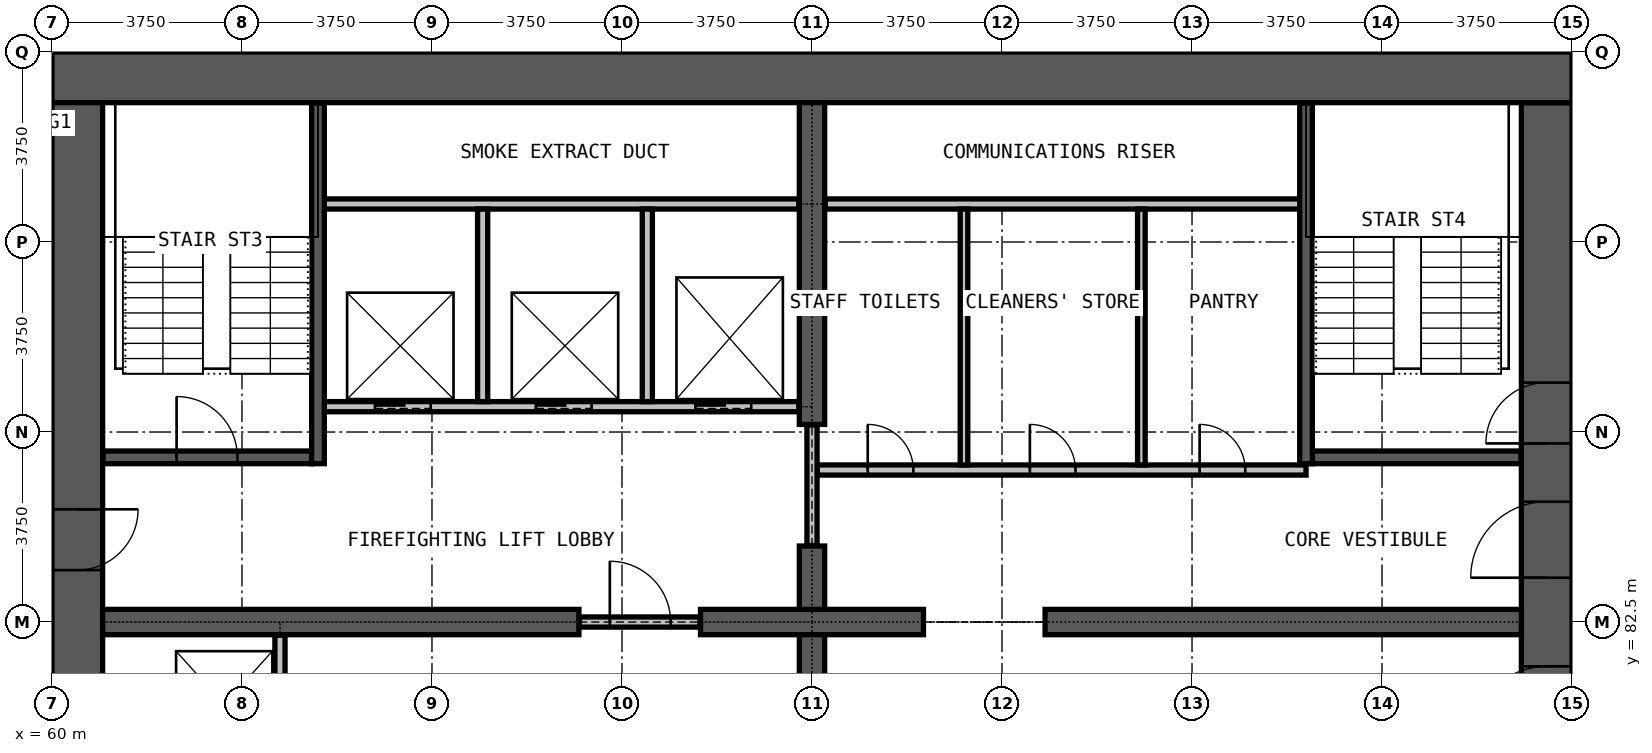
"""IFC4 building model, lengths in metres.
Left out: names, types, materials, properties, quantities, classifications, styles, units other than length and angle.
Written with IfcOpenShell. Run it as: python <this file> out.ifc"""

import sys

from ifc_helpers import new_model, si_unit, direction, frame, frame_2d, origin, place, context, subcontext, project, spatial, rectangle, extrude, element, fill, save


model = new_model("IFC4")
c1 = context("Model", 3, precision=1e-05, world=origin(), true_north=direction((0.0, 1.0)))
c2 = subcontext(c1, "Body", "Model", "MODEL_VIEW")
j1 = project(units=[si_unit("LENGTHUNIT", "METRE"), si_unit("PLANEANGLEUNIT", "RADIAN")], contexts=[c1])
p1 = place(None, origin())
s1 = spatial("IfcSite", under=j1, at=p1, CompositionType="ELEMENT")
p2 = place(p1, origin())
s2 = spatial("IfcBuilding", under=s1, at=p2, CompositionType="ELEMENT")
p3 = place(p2, frame((0.0, 0.0, 49.4)))
s3 = spatial("IfcBuildingStorey", under=s2, at=p3, CompositionType="ELEMENT", Elevation=49.4)
p4 = place(p3, frame((89.5, 72.25, 0.0), z_axis=(0.0, 0.0, 1.0), x_axis=(0.0, 1.0, 0.0)))
e1 = element("IfcWall", 1, at=p4, inside=s3, PredefinedType="SHEAR", context=c2, shape_type="SweptSolid", body=[
    extrude(rectangle(XDim=20.5, YDim=1.0, at=frame_2d((10.25, 0.0))), origin(), (0.0, 0.0, 1.0), 3.3),
])
p5 = place(p4, frame((0.275, 0.0, 0.0)))
e2 = element("IfcOpeningElement", 2, at=p5, cuts=e1, PredefinedType="OPENING", context=c2, shape_type="SweptSolid", body=[
    extrude(rectangle(XDim=1.2, YDim=2.2, at=frame_2d((0.6, 1.1))), frame((0.0, 0.51, 0.0), z_axis=(0.0, -1.0, 0.0), x_axis=(1.0, 0.0, 0.0)), (0.0, 0.0, 1.0), 1.02),
])
p6 = place(p4, frame((13.775, 0.0, 0.0)))
e3 = element("IfcOpeningElement", 3, at=p6, cuts=e1, PredefinedType="OPENING", context=c2, shape_type="SweptSolid", body=[
    extrude(rectangle(XDim=1.2, YDim=2.2, at=frame_2d((0.6, 1.1))), frame((0.0, 0.51, 0.0), z_axis=(0.0, -1.0, 0.0), x_axis=(1.0, 0.0, 0.0)), (0.0, 0.0, 1.0), 1.02),
])
p7 = place(p4, frame((7.875, 0.0, 0.0)))
e4 = element("IfcOpeningElement", 4, at=p7, cuts=e1, PredefinedType="OPENING", context=c2, shape_type="SweptSolid", body=[
    extrude(rectangle(XDim=1.5, YDim=2.2, at=frame_2d((0.75, 1.1))), frame((0.0, 0.51, 0.0), z_axis=(0.0, -1.0, 0.0), x_axis=(1.0, 0.0, 0.0)), (0.0, 0.0, 1.0), 1.02),
])
p8 = place(p4, frame((11.125, 0.0, 0.0)))
e5 = element("IfcOpeningElement", 5, at=p8, cuts=e1, PredefinedType="OPENING", context=c2, shape_type="SweptSolid", body=[
    extrude(rectangle(XDim=1.5, YDim=2.2, at=frame_2d((0.75, 1.1))), frame((0.0, 0.51, 0.0), z_axis=(0.0, -1.0, 0.0), x_axis=(1.0, 0.0, 0.0)), (0.0, 0.0, 1.0), 1.02),
])
p9 = place(p3, frame((90.0, 93.25, 0.0), z_axis=(0.0, 0.0, 1.0), x_axis=(-1.0, 0.0, 0.0)))
e6 = element("IfcWall", 6, at=p9, inside=s3, PredefinedType="SHEAR", context=c2, shape_type="SweptSolid", body=[
    extrude(rectangle(XDim=30.0, YDim=1.0, at=frame_2d((15.0, 0.0))), origin(), (0.0, 0.0, 1.0), 3.3),
])
p10 = place(p3, frame((60.5, 92.75, 0.0), z_axis=(0.0, 0.0, 1.0), x_axis=(0.0, -1.0, 0.0)))
e7 = element("IfcWall", 7, at=p10, inside=s3, PredefinedType="SHEAR", context=c2, shape_type="SweptSolid", body=[
    extrude(rectangle(XDim=20.5, YDim=1.0, at=frame_2d((10.25, 0.0))), origin(), (0.0, 0.0, 1.0), 3.3),
])
p11 = place(p10, frame((19.025, 0.0, 0.0)))
e8 = element("IfcOpeningElement", 8, at=p11, cuts=e7, PredefinedType="OPENING", context=c2, shape_type="SweptSolid", body=[
    extrude(rectangle(XDim=1.2, YDim=2.2, at=frame_2d((0.6, 1.1))), frame((0.0, 0.51, 0.0), z_axis=(0.0, -1.0, 0.0), x_axis=(1.0, 0.0, 0.0)), (0.0, 0.0, 1.0), 1.02),
])
p12 = place(p10, frame((8.025, 0.0, 0.0)))
e9 = element("IfcOpeningElement", 9, at=p12, cuts=e7, PredefinedType="OPENING", context=c2, shape_type="SweptSolid", body=[
    extrude(rectangle(XDim=1.2, YDim=2.2, at=frame_2d((0.6, 1.1))), frame((0.0, 0.51, 0.0), z_axis=(0.0, -1.0, 0.0), x_axis=(1.0, 0.0, 0.0)), (0.0, 0.0, 1.0), 1.02),
])
p13 = place(p3, frame((61.0, 82.5, 0.0), z_axis=(0.0, 0.0, 1.0), x_axis=(1.0, 0.0, 0.0)))
e10 = element("IfcWall", 10, at=p13, inside=s3, PredefinedType="SHEAR", context=c2, shape_type="SweptSolid", body=[
    extrude(rectangle(XDim=9.4, YDim=0.5, at=frame_2d((4.7, 0.0))), origin(), (0.0, 0.0, 1.0), 3.3),
])
p14 = place(p3, frame((72.8, 82.5, 0.0), z_axis=(0.0, 0.0, 1.0), x_axis=(1.0, 0.0, 0.0)))
e11 = element("IfcWall", 11, at=p14, inside=s3, PredefinedType="SHEAR", context=c2, shape_type="SweptSolid", body=[
    extrude(rectangle(XDim=4.4, YDim=0.5, at=frame_2d((2.2, 0.0))), origin(), (0.0, 0.0, 1.0), 3.3),
])
p15 = place(p3, frame((79.6, 82.5, 0.0), z_axis=(0.0, 0.0, 1.0), x_axis=(1.0, 0.0, 0.0)))
e12 = element("IfcWall", 12, at=p15, inside=s3, PredefinedType="SHEAR", context=c2, shape_type="SweptSolid", body=[
    extrude(rectangle(XDim=9.4, YDim=0.5, at=frame_2d((4.7, 0.0))), origin(), (0.0, 0.0, 1.0), 3.3),
])
for number, where, z_axis, x_axis in (
    (13, (75.0, 81.0, 0.0), (0.0, 0.0, 1.0), (0.0, 1.0, 0.0)),
    (14, (75.0, 82.75, 0.0), (0.0, 0.0, 1.0), (0.0, 1.0, 0.0)),
):
    element("IfcWall", number, at=place(p3, frame(where, z_axis=z_axis, x_axis=x_axis)), inside=s3, PredefinedType="SHEAR", context=c2, shape_type="SweptSolid", body=[
        extrude(rectangle(XDim=1.25, YDim=0.5, at=frame_2d((0.625, 0.0))), origin(), (0.0, 0.0, 1.0), 3.3),
    ])
p16 = place(p3, frame((75.0, 86.4, 0.0), z_axis=(0.0, 0.0, 1.0), x_axis=(0.0, 1.0, 0.0)))
e15 = element("IfcWall", 15, at=p16, inside=s3, PredefinedType="SHEAR", context=c2, shape_type="SweptSolid", body=[
    extrude(rectangle(XDim=6.35, YDim=0.5, at=frame_2d((3.175, 0.0))), origin(), (0.0, 0.0, 1.0), 3.3),
])
p17 = place(p3, frame((70.41, 82.5, 0.0), z_axis=(0.0, 0.0, 1.0), x_axis=(1.0, 0.0, 0.0)))
e16 = element("IfcWall", 16, at=p17, inside=s3, PredefinedType="PARTITIONING", context=c2, shape_type="SweptSolid", body=[
    extrude(rectangle(XDim=2.38, YDim=0.2, at=frame_2d((1.19, 0.0))), origin(), (0.0, 0.0, 1.0), 2.4),
])
p18 = place(p17, frame((0.6, 0.0, 0.0)))
e17 = element("IfcOpeningElement", 17, at=p18, cuts=e16, PredefinedType="OPENING", context=c2, shape_type="SweptSolid", body=[
    extrude(rectangle(XDim=1.2, YDim=2.2, at=frame_2d((0.6, 1.1))), frame((0.0, 0.11, 0.0), z_axis=(0.0, -1.0, 0.0), x_axis=(1.0, 0.0, 0.0)), (0.0, 0.0, 1.0), 0.22),
])
p19 = place(p3, frame((75.1, 85.5, 0.0), z_axis=(0.0, 0.0, 1.0), x_axis=(1.0, 0.0, 0.0)))
e18 = element("IfcWall", 18, at=p19, inside=s3, PredefinedType="PARTITIONING", context=c2, shape_type="SweptSolid", body=[
    extrude(rectangle(XDim=9.65, YDim=0.2, at=frame_2d((4.825, 0.0))), origin(), (0.0, 0.0, 1.0), 3.0),
])
p20 = place(p19, frame((1.0, 0.0, 0.0)))
e19 = element("IfcOpeningElement", 19, at=p20, cuts=e18, PredefinedType="OPENING", context=c2, shape_type="SweptSolid", body=[
    extrude(rectangle(XDim=0.9, YDim=2.2, at=frame_2d((0.45, 1.1))), frame((0.0, 0.11, 0.0), z_axis=(0.0, -1.0, 0.0), x_axis=(1.0, 0.0, 0.0)), (0.0, 0.0, 1.0), 0.22),
])
p21 = place(p19, frame((4.2, 0.0, 0.0)))
e20 = element("IfcOpeningElement", 20, at=p21, cuts=e18, PredefinedType="OPENING", context=c2, shape_type="SweptSolid", body=[
    extrude(rectangle(XDim=0.9, YDim=2.2, at=frame_2d((0.45, 1.1))), frame((0.0, 0.11, 0.0), z_axis=(0.0, -1.0, 0.0), x_axis=(1.0, 0.0, 0.0)), (0.0, 0.0, 1.0), 0.22),
])
p22 = place(p19, frame((7.55, 0.0, 0.0)))
e21 = element("IfcOpeningElement", 21, at=p22, cuts=e18, PredefinedType="OPENING", context=c2, shape_type="SweptSolid", body=[
    extrude(rectangle(XDim=0.9, YDim=2.2, at=frame_2d((0.45, 1.1))), frame((0.0, 0.11, 0.0), z_axis=(0.0, -1.0, 0.0), x_axis=(1.0, 0.0, 0.0)), (0.0, 0.0, 1.0), 0.22),
])
p23 = place(p3, frame((75.26, 90.75, 0.0), z_axis=(0.0, 0.0, 1.0), x_axis=(1.0, 0.0, 0.0)))
e22 = element("IfcWall", 22, at=p23, inside=s3, PredefinedType="PARTITIONING", context=c2, shape_type="SweptSolid", body=[
    extrude(rectangle(XDim=9.365, YDim=0.2, at=frame_2d((4.683, 0.0))), origin(), (0.0, 0.0, 1.0), 3.0),
])
p24 = place(p3, frame((75.0, 84.01, 0.0), z_axis=(0.0, 0.0, 1.0), x_axis=(0.0, 1.0, 0.0)))
e23 = element("IfcWall", 23, at=p24, inside=s3, PredefinedType="PARTITIONING", context=c2, shape_type="SweptSolid", body=[
    extrude(rectangle(XDim=2.38, YDim=0.2, at=frame_2d((1.19, 0.0))), origin(), (0.0, 0.0, 1.0), 2.4),
])
for number, where, z_axis, x_axis in (
    (24, (78.0, 85.6, 0.0), (0.0, 0.0, 1.0), (0.0, 1.0, 0.0)),
    (25, (81.5, 85.6, 0.0), (0.0, 0.0, 1.0), (0.0, 1.0, 0.0)),
):
    element("IfcWall", number, at=place(p3, frame(where, z_axis=z_axis, x_axis=x_axis)), inside=s3, PredefinedType="PARTITIONING", context=c2, shape_type="SweptSolid", body=[
        extrude(rectangle(XDim=5.05, YDim=0.15, at=frame_2d((2.525, 0.0))), origin(), (0.0, 0.0, 1.0), 3.0),
    ])
p25 = place(p3, frame((65.375, 86.75, 0.0), z_axis=(0.0, 0.0, 1.0), x_axis=(1.0, 0.0, 0.0)))
e26 = element("IfcWall", 26, at=p25, inside=s3, PredefinedType="PARTITIONING", context=c2, shape_type="SweptSolid", body=[
    extrude(rectangle(XDim=9.365, YDim=0.2, at=frame_2d((4.683, 0.0))), origin(), (0.0, 0.0, 1.0), 3.0),
])
p26 = place(p25, frame((1.0, 0.0, 0.0)))
e27 = element("IfcOpeningElement", 27, at=p26, cuts=e26, PredefinedType="OPENING", context=c2, shape_type="SweptSolid", body=[
    extrude(rectangle(XDim=1.1, YDim=2.2, at=frame_2d((0.55, 1.1))), frame((0.0, 0.11, 0.0), z_axis=(0.0, -1.0, 0.0), x_axis=(1.0, 0.0, 0.0)), (0.0, 0.0, 1.0), 0.22),
])
p27 = place(p25, frame((4.175, 0.0, 0.0)))
e28 = element("IfcOpeningElement", 28, at=p27, cuts=e26, PredefinedType="OPENING", context=c2, shape_type="SweptSolid", body=[
    extrude(rectangle(XDim=1.1, YDim=2.2, at=frame_2d((0.55, 1.1))), frame((0.0, 0.11, 0.0), z_axis=(0.0, -1.0, 0.0), x_axis=(1.0, 0.0, 0.0)), (0.0, 0.0, 1.0), 0.22),
])
p28 = place(p25, frame((7.325, 0.0, 0.0)))
e29 = element("IfcOpeningElement", 29, at=p28, cuts=e26, PredefinedType="OPENING", context=c2, shape_type="SweptSolid", body=[
    extrude(rectangle(XDim=1.1, YDim=2.2, at=frame_2d((0.55, 1.1))), frame((0.0, 0.11, 0.0), z_axis=(0.0, -1.0, 0.0), x_axis=(1.0, 0.0, 0.0)), (0.0, 0.0, 1.0), 0.22),
])
p29 = place(p3, frame((65.375, 90.75, 0.0), z_axis=(0.0, 0.0, 1.0), x_axis=(1.0, 0.0, 0.0)))
e30 = element("IfcWall", 30, at=p29, inside=s3, PredefinedType="PARTITIONING", context=c2, shape_type="SweptSolid", body=[
    extrude(rectangle(XDim=9.365, YDim=0.2, at=frame_2d((4.683, 0.0))), origin(), (0.0, 0.0, 1.0), 3.0),
])
p30 = place(p3, frame((64.5, 79.375, 0.0), z_axis=(0.0, 0.0, 1.0), x_axis=(0.0, 1.0, 0.0)))
e31 = element("IfcWall", 31, at=p30, inside=s3, PredefinedType="PARTITIONING", context=c2, shape_type="SweptSolid", body=[
    extrude(rectangle(XDim=2.865, YDim=0.2, at=frame_2d((1.433, 0.0))), origin(), (0.0, 0.0, 1.0), 3.0),
])
for number, where, z_axis, x_axis in (
    (32, (68.5, 86.85, 0.0), (0.0, 0.0, 1.0), (0.0, 1.0, 0.0)),
    (33, (71.75, 86.85, 0.0), (0.0, 0.0, 1.0), (0.0, 1.0, 0.0)),
):
    element("IfcWall", number, at=place(p3, frame(where, z_axis=z_axis, x_axis=x_axis)), inside=s3, PredefinedType="PARTITIONING", context=c2, shape_type="SweptSolid", body=[
        extrude(rectangle(XDim=3.8, YDim=0.2, at=frame_2d((1.9, 0.0))), origin(), (0.0, 0.0, 1.0), 3.0),
    ])
p31 = place(p3, frame((61.01, 85.75, 0.0), z_axis=(0.0, 0.0, 1.0), x_axis=(1.0, 0.0, 0.0)))
e34 = element("IfcWall", 34, at=p31, inside=s3, PredefinedType="PARTITIONING", context=c2, shape_type="SweptSolid", body=[
    extrude(rectangle(XDim=4.115, YDim=0.25, at=frame_2d((2.058, 0.0))), origin(), (0.0, 0.0, 1.0), 3.0),
])
p32 = place(p31, frame((1.45, 0.0, 0.0)))
e35 = element("IfcOpeningElement", 35, at=p32, cuts=e34, PredefinedType="OPENING", context=c2, shape_type="SweptSolid", body=[
    extrude(rectangle(XDim=1.2, YDim=2.2, at=frame_2d((0.6, 1.1))), frame((0.0, 0.135, 0.0), z_axis=(0.0, -1.0, 0.0), x_axis=(1.0, 0.0, 0.0)), (0.0, 0.0, 1.0), 0.27),
])
p33 = place(p3, frame((84.875, 85.75, 0.0), z_axis=(0.0, 0.0, 1.0), x_axis=(1.0, 0.0, 0.0)))
e36 = element("IfcWall", 36, at=p33, inside=s3, PredefinedType="PARTITIONING", context=c2, shape_type="SweptSolid", body=[
    extrude(rectangle(XDim=4.115, YDim=0.25, at=frame_2d((2.058, 0.0))), origin(), (0.0, 0.0, 1.0), 3.0),
])
for number, where, z_axis, x_axis in (
    (37, (65.25, 85.625, 0.0), (0.0, 0.0, 1.0), (0.0, 1.0, 0.0)),
    (38, (84.75, 85.625, 0.0), (0.0, 0.0, 1.0), (0.0, 1.0, 0.0)),
):
    element("IfcWall", number, at=place(p3, frame(where, z_axis=z_axis, x_axis=x_axis)), inside=s3, PredefinedType="PARTITIONING", context=c2, shape_type="SweptSolid", body=[
        extrude(rectangle(XDim=7.115, YDim=0.25, at=frame_2d((3.558, 0.0))), origin(), (0.0, 0.0, 1.0), 3.0),
    ])
p34 = place(p26, origin())
e39 = element("IfcDoor", 39, at=p34, inside=s3, OperationType="DOUBLE_DOOR_SLIDING", PredefinedType="DOOR", context=c2, shape_type="SweptSolid", body=[
    extrude(rectangle(XDim=1.1, YDim=2.2, at=frame_2d((0.55, 1.1))), frame((0.0, 0.025, 0.0), z_axis=(0.0, -1.0, 0.0), x_axis=(1.0, 0.0, 0.0)), (0.0, 0.0, 1.0), 0.05),
])
fill(e27, e39)
p35 = place(p27, origin())
e40 = element("IfcDoor", 40, at=p35, inside=s3, OperationType="DOUBLE_DOOR_SLIDING", PredefinedType="DOOR", context=c2, shape_type="SweptSolid", body=[
    extrude(rectangle(XDim=1.1, YDim=2.2, at=frame_2d((0.55, 1.1))), frame((0.0, 0.025, 0.0), z_axis=(0.0, -1.0, 0.0), x_axis=(1.0, 0.0, 0.0)), (0.0, 0.0, 1.0), 0.05),
])
fill(e28, e40)
p36 = place(p28, origin())
e41 = element("IfcDoor", 41, at=p36, inside=s3, OperationType="DOUBLE_DOOR_SLIDING", PredefinedType="DOOR", context=c2, shape_type="SweptSolid", body=[
    extrude(rectangle(XDim=1.1, YDim=2.2, at=frame_2d((0.55, 1.1))), frame((0.0, 0.025, 0.0), z_axis=(0.0, -1.0, 0.0), x_axis=(1.0, 0.0, 0.0)), (0.0, 0.0, 1.0), 0.05),
])
fill(e29, e41)
p37 = place(p18, origin())
e42 = element("IfcDoor", 42, at=p37, inside=s3, OperationType="SINGLE_SWING_RIGHT", PredefinedType="DOOR", context=c2, shape_type="SweptSolid", body=[
    extrude(rectangle(XDim=1.2, YDim=2.2, at=frame_2d((0.6, 1.1))), frame((0.0, 0.025, 0.0), z_axis=(0.0, -1.0, 0.0), x_axis=(1.0, 0.0, 0.0)), (0.0, 0.0, 1.0), 0.05),
])
fill(e17, e42)
p38 = place(p32, origin())
e43 = element("IfcDoor", 43, at=p38, inside=s3, OperationType="SINGLE_SWING_RIGHT", PredefinedType="DOOR", context=c2, shape_type="SweptSolid", body=[
    extrude(rectangle(XDim=1.2, YDim=2.2, at=frame_2d((0.6, 1.1))), frame((0.0, 0.025, 0.0), z_axis=(0.0, -1.0, 0.0), x_axis=(1.0, 0.0, 0.0)), (0.0, 0.0, 1.0), 0.05),
])
fill(e35, e43)
p39 = place(p6, origin())
e44 = element("IfcDoor", 44, at=p39, inside=s3, OperationType="SINGLE_SWING_RIGHT", PredefinedType="DOOR", context=c2, shape_type="SweptSolid", body=[
    extrude(rectangle(XDim=1.2, YDim=2.2, at=frame_2d((0.6, 1.1))), frame((0.0, 0.025, 0.0), z_axis=(0.0, -1.0, 0.0), x_axis=(1.0, 0.0, 0.0)), (0.0, 0.0, 1.0), 0.05),
])
fill(e3, e44)
p40 = place(p7, origin())
e45 = element("IfcDoor", 45, at=p40, inside=s3, OperationType="DOUBLE_DOOR_SINGLE_SWING", PredefinedType="DOOR", context=c2, shape_type="SweptSolid", body=[
    extrude(rectangle(XDim=1.5, YDim=2.2, at=frame_2d((0.75, 1.1))), frame((0.0, 0.025, 0.0), z_axis=(0.0, -1.0, 0.0), x_axis=(1.0, 0.0, 0.0)), (0.0, 0.0, 1.0), 0.05),
])
fill(e4, e45)
p41 = place(p12, origin())
e46 = element("IfcDoor", 46, at=p41, inside=s3, OperationType="SINGLE_SWING_LEFT", PredefinedType="DOOR", context=c2, shape_type="SweptSolid", body=[
    extrude(rectangle(XDim=1.2, YDim=2.2, at=frame_2d((0.6, 1.1))), frame((0.0, 0.025, 0.0), z_axis=(0.0, -1.0, 0.0), x_axis=(1.0, 0.0, 0.0)), (0.0, 0.0, 1.0), 0.05),
])
fill(e9, e46)
p42 = place(p8, origin())
e47 = element("IfcDoor", 47, at=p42, inside=s3, OperationType="DOUBLE_DOOR_SINGLE_SWING", PredefinedType="DOOR", context=c2, shape_type="SweptSolid", body=[
    extrude(rectangle(XDim=1.5, YDim=2.2, at=frame_2d((0.75, 1.1))), frame((0.0, 0.025, 0.0), z_axis=(0.0, -1.0, 0.0), x_axis=(1.0, 0.0, 0.0)), (0.0, 0.0, 1.0), 0.05),
])
fill(e5, e47)
p43 = place(p20, origin())
e48 = element("IfcDoor", 48, at=p43, inside=s3, OperationType="SINGLE_SWING_RIGHT", PredefinedType="DOOR", context=c2, shape_type="SweptSolid", body=[
    extrude(rectangle(XDim=0.9, YDim=2.2, at=frame_2d((0.45, 1.1))), frame((0.0, 0.025, 0.0), z_axis=(0.0, -1.0, 0.0), x_axis=(1.0, 0.0, 0.0)), (0.0, 0.0, 1.0), 0.05),
])
fill(e19, e48)
p44 = place(p21, origin())
e49 = element("IfcDoor", 49, at=p44, inside=s3, OperationType="SINGLE_SWING_LEFT", PredefinedType="DOOR", context=c2, shape_type="SweptSolid", body=[
    extrude(rectangle(XDim=0.9, YDim=2.2, at=frame_2d((0.45, 1.1))), frame((0.0, 0.025, 0.0), z_axis=(0.0, -1.0, 0.0), x_axis=(1.0, 0.0, 0.0)), (0.0, 0.0, 1.0), 0.05),
])
fill(e20, e49)
p45 = place(p22, origin())
e50 = element("IfcDoor", 50, at=p45, inside=s3, OperationType="SINGLE_SWING_RIGHT", PredefinedType="DOOR", context=c2, shape_type="SweptSolid", body=[
    extrude(rectangle(XDim=0.9, YDim=2.2, at=frame_2d((0.45, 1.1))), frame((0.0, 0.025, 0.0), z_axis=(0.0, -1.0, 0.0), x_axis=(1.0, 0.0, 0.0)), (0.0, 0.0, 1.0), 0.05),
])
fill(e21, e50)
save(model, sys.argv[1])
